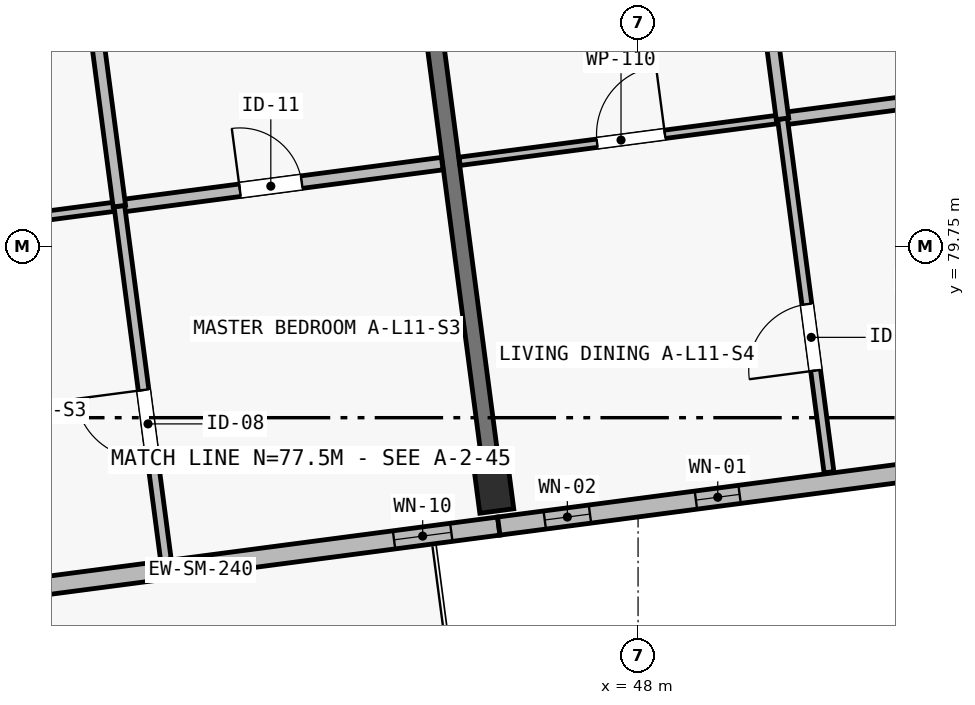
"""IFC4 building model, lengths in metres.
Left out: names, types, materials, properties, quantities, classifications, styles, units other than length and angle.
Written with IfcOpenShell. Run it as: python <this file> out.ifc"""

import sys

from ifc_helpers import new_model, si_unit, direction, frame, frame_2d, origin, origin_2d, place, context, subcontext, project, spatial, rectangle, extrude, element, fill, save


model = new_model("IFC4")
c1 = context("Model", 3, precision=1e-05, world=origin(), true_north=direction((0.0, 1.0)))
c2 = subcontext(c1, "Body", "Model", "MODEL_VIEW")
j1 = project(units=[si_unit("LENGTHUNIT", "METRE"), si_unit("PLANEANGLEUNIT", "RADIAN")], contexts=[c1])
p1 = place(None, origin())
s1 = spatial("IfcSite", under=j1, at=p1, CompositionType="ELEMENT")
p2 = place(p1, origin())
s2 = spatial("IfcBuilding", under=s1, at=p2, CompositionType="ELEMENT")
p3 = place(p2, frame((0.0, 0.0, 37.65)))
s3 = spatial("IfcBuildingStorey", under=s2, at=p3, CompositionType="ELEMENT", Elevation=37.65)
p4 = place(p3, frame((46.099, 76.594, 0.0), z_axis=(0.0, 0.0, 1.0), x_axis=(0.991444861374, 0.13052619222, 0.0)))
e1 = element("IfcColumn", 1, at=p4, inside=s3, PredefinedType="COLUMN", context=c2, shape_type="SweptSolid", body=[
    extrude(rectangle(XDim=0.45, YDim=0.65, at=origin_2d()), origin(), (0.0, 0.0, 1.0), 3.25),
])
p5 = place(p3, frame((46.056, 76.917, 0.0), z_axis=(0.0, 0.0, 1.0), x_axis=(-0.130503975686, 0.991447785983, 0.0)))
e2 = element("IfcWall", 2, at=p5, inside=s3, PredefinedType="SHEAR", context=c2, shape_type="SweptSolid", body=[
    extrude(rectangle(XDim=7.15, YDim=0.22, at=frame_2d((3.575, 0.0))), origin(), (0.0, 0.0, 1.0), 2.5),
])
p6 = place(p3, frame((46.167, 76.074, 0.0), z_axis=(0.0, 0.0, 1.0), x_axis=(-0.991444377792, -0.130529865336, 0.0)))
e3 = element("IfcWall", 3, at=p6, inside=s3, PredefinedType="SOLIDWALL", context=c2, shape_type="SweptSolid", body=[
    extrude(rectangle(XDim=8.8, YDim=0.24, at=frame_2d((4.4, 0.0))), origin(), (0.0, 0.0, 1.0), 3.0),
])
p7 = place(p6, frame((5.997, 0.0, 0.0)))
e4 = element("IfcOpeningElement", 4, at=p7, cuts=e3, PredefinedType="OPENING", context=c2, shape_type="SweptSolid", body=[
    extrude(rectangle(XDim=1.8, YDim=2.12, at=frame_2d((0.9, 1.06))), frame((0.0, 0.135, 0.0), z_axis=(0.0, -1.0, 0.0), x_axis=(1.0, 0.0, 0.0)), (0.0, 0.0, 1.0), 0.27),
])
p8 = place(p6, frame((0.63, 0.0, 0.5)))
e5 = element("IfcOpeningElement", 5, at=p8, cuts=e3, PredefinedType="OPENING", context=c2, shape_type="SweptSolid", body=[
    extrude(rectangle(XDim=0.76, YDim=2.34, at=frame_2d((0.38, 1.17))), frame((0.0, 0.135, 0.0), z_axis=(0.0, -1.0, 0.0), x_axis=(1.0, 0.0, 0.0)), (0.0, 0.0, 1.0), 0.27),
])
p9 = place(p3, frame((54.892, 77.223, 0.0), z_axis=(0.0, 0.0, 1.0), x_axis=(-0.991443905089, -0.130533455715, 0.0)))
e6 = element("IfcWall", 6, at=p9, inside=s3, PredefinedType="SOLIDWALL", context=c2, shape_type="SweptSolid", body=[
    extrude(rectangle(XDim=8.8, YDim=0.24, at=frame_2d((4.4, 0.0))), origin(), (0.0, 0.0, 1.0), 3.0),
])
p10 = place(p9, frame((1.342, 0.0, 0.42)))
e7 = element("IfcOpeningElement", 7, at=p10, cuts=e6, PredefinedType="OPENING", context=c2, shape_type="SweptSolid", body=[
    extrude(rectangle(XDim=0.82, YDim=2.18, at=frame_2d((0.41, 1.09))), frame((0.0, 0.135, 0.0), z_axis=(0.0, -1.0, 0.0), x_axis=(1.0, 0.0, 0.0)), (0.0, 0.0, 1.0), 0.27),
])
p11 = place(p9, frame((5.604, 0.0, 0.42)))
e8 = element("IfcOpeningElement", 8, at=p11, cuts=e6, PredefinedType="OPENING", context=c2, shape_type="SweptSolid", body=[
    extrude(rectangle(XDim=0.58, YDim=2.16, at=frame_2d((0.29, 1.08))), frame((0.0, 0.135, 0.0), z_axis=(0.0, -1.0, 0.0), x_axis=(1.0, 0.0, 0.0)), (0.0, 0.0, 1.0), 0.27),
])
p12 = place(p9, frame((7.59, 0.0, 0.48)))
e9 = element("IfcOpeningElement", 9, at=p12, cuts=e6, PredefinedType="OPENING", context=c2, shape_type="SweptSolid", body=[
    extrude(rectangle(XDim=0.6, YDim=2.22, at=frame_2d((0.3, 1.11))), frame((0.0, 0.135, 0.0), z_axis=(0.0, -1.0, 0.0), x_axis=(1.0, 0.0, 0.0)), (0.0, 0.0, 1.0), 0.27),
])
p13 = place(p3, frame((36.927, 79.724, 0.0), z_axis=(0.0, 0.0, 1.0), x_axis=(0.991444014242, 0.130532626667, 0.0)))
e10 = element("IfcWall", 10, at=p13, inside=s3, PredefinedType="PARTITIONING", context=c2, shape_type="SweptSolid", body=[
    extrude(rectangle(XDim=4.285, YDim=0.12, at=frame_2d((2.143, 0.0))), origin(), (0.0, 0.0, 1.0), 2.97),
])
p14 = place(p13, frame((1.825, 0.0, 0.0)))
e11 = element("IfcOpeningElement", 11, at=p14, cuts=e10, PredefinedType="OPENING", context=c2, shape_type="SweptSolid", body=[
    extrude(rectangle(XDim=0.9, YDim=2.1, at=frame_2d((0.45, 1.05))), frame((0.0, 0.075, 0.0), z_axis=(0.0, -1.0, 0.0), x_axis=(1.0, 0.0, 0.0)), (0.0, 0.0, 1.0), 0.15),
])
p15 = place(p3, frame((41.175, 80.283, 0.0), z_axis=(0.0, 0.0, 1.0), x_axis=(0.991444014242, 0.130532626667, 0.0)))
e12 = element("IfcWall", 12, at=p15, inside=s3, PredefinedType="PLUMBINGWALL", context=c2, shape_type="SweptSolid", body=[
    extrude(rectangle(XDim=4.285, YDim=0.165, at=frame_2d((2.143, 0.0))), origin(), (0.0, 0.0, 1.0), 2.97),
])
p16 = place(p15, frame((1.6, 0.0, 0.0)))
e13 = element("IfcOpeningElement", 13, at=p16, cuts=e12, PredefinedType="OPENING", context=c2, shape_type="SweptSolid", body=[
    extrude(rectangle(XDim=0.82, YDim=2.08, at=frame_2d((0.41, 1.04))), frame((0.0, 0.097, 0.0), z_axis=(0.0, -1.0, 0.0), x_axis=(1.0, 0.0, 0.0)), (0.0, 0.0, 1.0), 0.195),
])
p17 = place(p3, frame((41.787, 75.634, 0.0), z_axis=(0.0, 0.0, 1.0), x_axis=(-0.130502988823, 0.991447915883, 0.0)))
e14 = element("IfcWall", 14, at=p17, inside=s3, PredefinedType="PARTITIONING", context=c2, shape_type="SweptSolid", body=[
    extrude(rectangle(XDim=4.69, YDim=0.14, at=frame_2d((2.345, 0.0))), origin(), (0.0, 0.0, 1.0), 2.97),
])
p18 = place(p17, frame((1.35, 0.0, 0.0)))
e15 = element("IfcOpeningElement", 15, at=p18, cuts=e14, PredefinedType="OPENING", context=c2, shape_type="SweptSolid", body=[
    extrude(rectangle(XDim=0.9, YDim=2.1, at=frame_2d((0.45, 1.05))), frame((0.0, 0.085, 0.0), z_axis=(0.0, -1.0, 0.0), x_axis=(1.0, 0.0, 0.0)), (0.0, 0.0, 1.0), 0.17),
])
p19 = place(p3, frame((41.175, 80.283, 0.0), z_axis=(0.0, 0.0, 1.0), x_axis=(-0.130539898676, 0.991443056788, 0.0)))
e16 = element("IfcWall", 16, at=p19, inside=s3, PredefinedType="PLUMBINGWALL", context=c2, shape_type="SweptSolid", body=[
    extrude(rectangle(XDim=3.92, YDim=0.165, at=frame_2d((1.96, 0.0))), origin(), (0.0, 0.0, 1.0), 2.97),
])
p20 = place(p3, frame((45.652, 80.873, 0.0), z_axis=(0.0, 0.0, 1.0), x_axis=(0.991444014242, 0.130532626667, 0.0)))
e17 = element("IfcWall", 17, at=p20, inside=s3, PredefinedType="PARTITIONING", context=c2, shape_type="SweptSolid", body=[
    extrude(rectangle(XDim=4.285, YDim=0.11, at=frame_2d((2.143, 0.0))), origin(), (0.0, 0.0, 1.0), 2.97),
])
p21 = place(p20, frame((1.825, 0.0, 0.0)))
e18 = element("IfcOpeningElement", 18, at=p21, cuts=e17, PredefinedType="OPENING", context=c2, shape_type="SweptSolid", body=[
    extrude(rectangle(XDim=0.9, YDim=2.1, at=frame_2d((0.45, 1.05))), frame((0.0, 0.07, 0.0), z_axis=(0.0, -1.0, 0.0), x_axis=(1.0, 0.0, 0.0)), (0.0, 0.0, 1.0), 0.14),
])
p22 = place(p3, frame((49.9, 81.432, 0.0), z_axis=(0.0, 0.0, 1.0), x_axis=(0.991444014242, 0.130532626667, 0.0)))
e19 = element("IfcWall", 19, at=p22, inside=s3, PredefinedType="PLUMBINGWALL", context=c2, shape_type="SweptSolid", body=[
    extrude(rectangle(XDim=4.285, YDim=0.165, at=frame_2d((2.143, 0.0))), origin(), (0.0, 0.0, 1.0), 2.97),
])
p23 = place(p22, frame((1.6, 0.0, 0.0)))
e20 = element("IfcOpeningElement", 20, at=p23, cuts=e19, PredefinedType="OPENING", context=c2, shape_type="SweptSolid", body=[
    extrude(rectangle(XDim=0.82, YDim=2.08, at=frame_2d((0.41, 1.04))), frame((0.0, 0.097, 0.0), z_axis=(0.0, -1.0, 0.0), x_axis=(1.0, 0.0, 0.0)), (0.0, 0.0, 1.0), 0.195),
])
p24 = place(p3, frame((50.512, 76.782, 0.0), z_axis=(0.0, 0.0, 1.0), x_axis=(-0.130554157184, 0.991441179315, 0.0)))
e21 = element("IfcWall", 21, at=p24, inside=s3, PredefinedType="PARTITIONING", context=c2, shape_type="SweptSolid", body=[
    extrude(rectangle(XDim=4.69, YDim=0.13, at=frame_2d((2.345, 0.0))), origin(), (0.0, 0.0, 1.0), 2.97),
])
p25 = place(p24, frame((1.35, 0.0, 0.0)))
e22 = element("IfcOpeningElement", 22, at=p25, cuts=e21, PredefinedType="OPENING", context=c2, shape_type="SweptSolid", body=[
    extrude(rectangle(XDim=0.88, YDim=2.1, at=frame_2d((0.44, 1.05))), frame((0.0, 0.08, 0.0), z_axis=(0.0, -1.0, 0.0), x_axis=(1.0, 0.0, 0.0)), (0.0, 0.0, 1.0), 0.16),
])
p26 = place(p3, frame((49.9, 81.432, 0.0), z_axis=(0.0, 0.0, 1.0), x_axis=(-0.130539898676, 0.991443056788, 0.0)))
e23 = element("IfcWall", 23, at=p26, inside=s3, PredefinedType="PLUMBINGWALL", context=c2, shape_type="SweptSolid", body=[
    extrude(rectangle(XDim=3.92, YDim=0.165, at=frame_2d((1.96, 0.0))), origin(), (0.0, 0.0, 1.0), 2.97),
])
p27 = place(p8, origin())
e24 = element("IfcWindow", 24, at=p27, inside=s3, PartitioningType="SINGLE_PANEL", PredefinedType="WINDOW", context=c2, shape_type="SweptSolid", body=[
    extrude(rectangle(XDim=0.76, YDim=2.34, at=frame_2d((0.38, 1.17))), frame((0.0, 0.03, 0.0), z_axis=(0.0, -1.0, 0.0), x_axis=(1.0, 0.0, 0.0)), (0.0, 0.0, 1.0), 0.06),
])
fill(e5, e24)
p28 = place(p11, origin())
e25 = element("IfcWindow", 25, at=p28, inside=s3, PartitioningType="SINGLE_PANEL", PredefinedType="WINDOW", context=c2, shape_type="SweptSolid", body=[
    extrude(rectangle(XDim=0.58, YDim=2.16, at=frame_2d((0.29, 1.08))), frame((0.0, 0.03, 0.0), z_axis=(0.0, -1.0, 0.0), x_axis=(1.0, 0.0, 0.0)), (0.0, 0.0, 1.0), 0.06),
])
fill(e8, e25)
p29 = place(p12, origin())
e26 = element("IfcWindow", 26, at=p29, inside=s3, PartitioningType="SINGLE_PANEL", PredefinedType="WINDOW", context=c2, shape_type="SweptSolid", body=[
    extrude(rectangle(XDim=0.6, YDim=2.22, at=frame_2d((0.3, 1.11))), frame((0.0, 0.03, 0.0), z_axis=(0.0, -1.0, 0.0), x_axis=(1.0, 0.0, 0.0)), (0.0, 0.0, 1.0), 0.06),
])
fill(e9, e26)
p30 = place(p16, origin())
e27 = element("IfcDoor", 27, at=p30, inside=s3, OperationType="SINGLE_SWING_LEFT", PredefinedType="DOOR", context=c2, shape_type="SweptSolid", body=[
    extrude(rectangle(XDim=0.82, YDim=2.08, at=frame_2d((0.41, 1.04))), frame((0.0, 0.025, 0.0), z_axis=(0.0, -1.0, 0.0), x_axis=(1.0, 0.0, 0.0)), (0.0, 0.0, 1.0), 0.05),
])
fill(e13, e27)
p31 = place(p18, origin())
e28 = element("IfcDoor", 28, at=p31, inside=s3, OperationType="SINGLE_SWING_RIGHT", PredefinedType="DOOR", context=c2, shape_type="SweptSolid", body=[
    extrude(rectangle(XDim=0.9, YDim=2.1, at=frame_2d((0.45, 1.05))), frame((0.0, 0.025, 0.0), z_axis=(0.0, -1.0, 0.0), x_axis=(1.0, 0.0, 0.0)), (0.0, 0.0, 1.0), 0.05),
])
fill(e15, e28)
p32 = place(p21, origin())
e29 = element("IfcDoor", 29, at=p32, inside=s3, OperationType="SINGLE_SWING_RIGHT", PredefinedType="DOOR", context=c2, shape_type="SweptSolid", body=[
    extrude(rectangle(XDim=0.9, YDim=2.1, at=frame_2d((0.45, 1.05))), frame((0.0, 0.025, 0.0), z_axis=(0.0, -1.0, 0.0), x_axis=(1.0, 0.0, 0.0)), (0.0, 0.0, 1.0), 0.05),
])
fill(e18, e29)
p33 = place(p25, origin())
e30 = element("IfcDoor", 30, at=p33, inside=s3, OperationType="SINGLE_SWING_LEFT", PredefinedType="DOOR", context=c2, shape_type="SweptSolid", body=[
    extrude(rectangle(XDim=0.88, YDim=2.1, at=frame_2d((0.44, 1.05))), frame((0.0, 0.025, 0.0), z_axis=(0.0, -1.0, 0.0), x_axis=(1.0, 0.0, 0.0)), (0.0, 0.0, 1.0), 0.05),
])
fill(e22, e30)
save(model, sys.argv[1])
